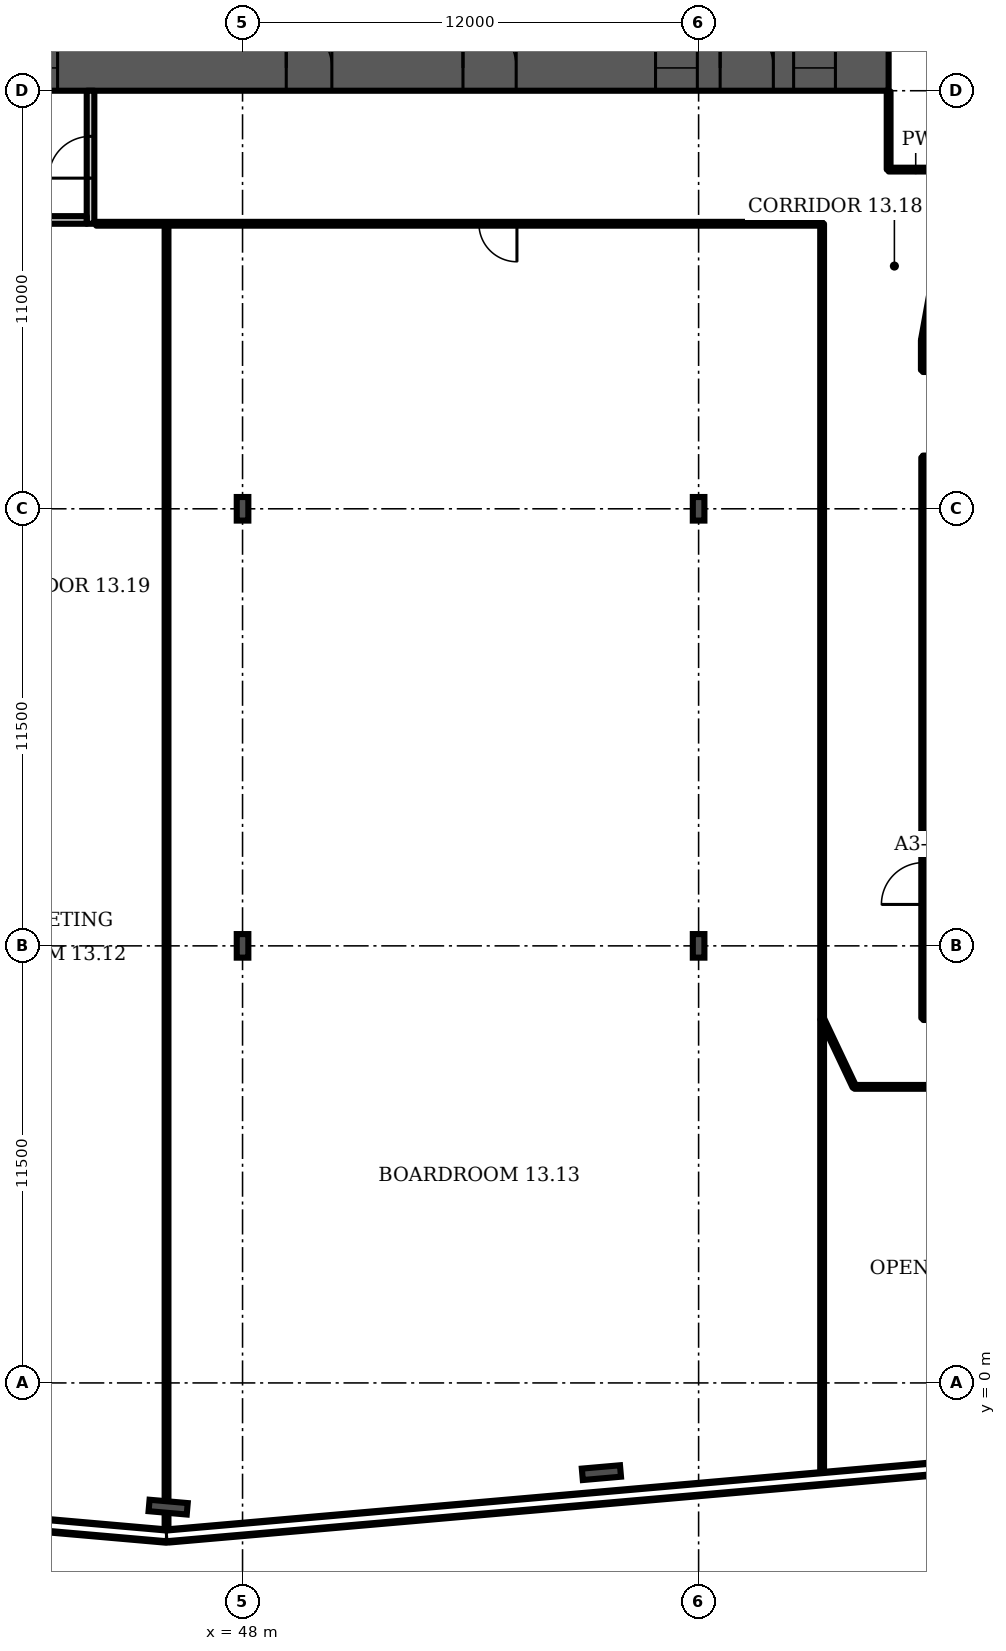
"""IFC4 building model, lengths in metres.
Left out: names, types, materials, properties, quantities, classifications, styles, units other than length and angle.
Written with IfcOpenShell. Run it as: python <this file> out.ifc"""

import sys

from ifc_helpers import new_model, si_unit, direction, frame, frame_2d, origin, origin_2d, place, context, subcontext, project, spatial, rectangle, i_section, extrude, element, fill, save


model = new_model("IFC4")
c1 = context("Model", 3, precision=1e-05, world=origin(), true_north=direction((0.0, 1.0)))
c2 = subcontext(c1, "Body", "Model", "MODEL_VIEW")
j1 = project(units=[si_unit("LENGTHUNIT", "METRE"), si_unit("PLANEANGLEUNIT", "RADIAN")], contexts=[c1])
p1 = place(None, origin())
s1 = spatial("IfcSite", under=j1, at=p1, CompositionType="ELEMENT")
p2 = place(p1, origin())
s2 = spatial("IfcBuilding", under=s1, at=p2, CompositionType="ELEMENT")
p3 = place(p2, frame((0.0, 0.0, 66.7)))
s3 = spatial("IfcBuildingStorey", under=s2, at=p3, CompositionType="ELEMENT", Elevation=66.7)
p4 = place(p3, frame((9.0, 34.6, 0.0), z_axis=(0.0, 0.0, 1.0), x_axis=(1.0, 0.0, 0.0)))
e1 = element("IfcWall", 1, at=p4, inside=s3, PredefinedType="SHEAR", context=c2, shape_type="SweptSolid", body=[
    extrude(rectangle(XDim=56.0, YDim=1.2, at=frame_2d((28.0, 0.0))), origin(), (0.0, 0.0, 1.0), 3.6),
])
p5 = place(p4, frame((2.0, 0.0, 0.0)))
e2 = element("IfcOpeningElement", 2, at=p5, cuts=e1, PredefinedType="OPENING", context=c2, shape_type="SweptSolid", body=[
    extrude(rectangle(XDim=1.0, YDim=2.1, at=frame_2d((0.5, 1.05))), frame((0.0, 0.61, 0.0), z_axis=(0.0, -1.0, 0.0), x_axis=(1.0, 0.0, 0.0)), (0.0, 0.0, 1.0), 1.22),
])
p6 = place(p4, frame((4.6, 0.0, 0.0)))
e3 = element("IfcOpeningElement", 3, at=p6, cuts=e1, PredefinedType="OPENING", context=c2, shape_type="SweptSolid", body=[
    extrude(rectangle(XDim=1.0, YDim=2.1, at=frame_2d((0.5, 1.05))), frame((0.0, 0.61, 0.0), z_axis=(0.0, -1.0, 0.0), x_axis=(1.0, 0.0, 0.0)), (0.0, 0.0, 1.0), 1.22),
])
p7 = place(p4, frame((7.867, 0.0, 0.0)))
e4 = element("IfcOpeningElement", 4, at=p7, cuts=e1, PredefinedType="OPENING", context=c2, shape_type="SweptSolid", body=[
    extrude(rectangle(XDim=1.1, YDim=2.1, at=frame_2d((0.55, 1.05))), frame((0.0, 0.61, 0.0), z_axis=(0.0, -1.0, 0.0), x_axis=(1.0, 0.0, 0.0)), (0.0, 0.0, 1.0), 1.22),
])
p8 = place(p4, frame((12.033, 0.0, 0.0)))
e5 = element("IfcOpeningElement", 5, at=p8, cuts=e1, PredefinedType="OPENING", context=c2, shape_type="SweptSolid", body=[
    extrude(rectangle(XDim=1.1, YDim=2.1, at=frame_2d((0.55, 1.05))), frame((0.0, 0.61, 0.0), z_axis=(0.0, -1.0, 0.0), x_axis=(1.0, 0.0, 0.0)), (0.0, 0.0, 1.0), 1.22),
])
p9 = place(p4, frame((9.8, 0.0, 0.0)))
e6 = element("IfcOpeningElement", 6, at=p9, cuts=e1, PredefinedType="OPENING", context=c2, shape_type="SweptSolid", body=[
    extrude(rectangle(XDim=1.4, YDim=2.1, at=frame_2d((0.7, 1.05))), frame((0.0, 0.61, 0.0), z_axis=(0.0, -1.0, 0.0), x_axis=(1.0, 0.0, 0.0)), (0.0, 0.0, 1.0), 1.22),
])
p10 = place(p4, frame((14.65, 0.0, 0.0)))
e7 = element("IfcOpeningElement", 7, at=p10, cuts=e1, PredefinedType="OPENING", context=c2, shape_type="SweptSolid", body=[
    extrude(rectangle(XDim=1.2, YDim=2.1, at=frame_2d((0.6, 1.05))), frame((0.0, 0.61, 0.0), z_axis=(0.0, -1.0, 0.0), x_axis=(1.0, 0.0, 0.0)), (0.0, 0.0, 1.0), 1.22),
])
p11 = place(p4, frame((21.867, 0.0, 0.0)))
e8 = element("IfcOpeningElement", 8, at=p11, cuts=e1, PredefinedType="OPENING", context=c2, shape_type="SweptSolid", body=[
    extrude(rectangle(XDim=1.1, YDim=2.1, at=frame_2d((0.55, 1.05))), frame((0.0, 0.61, 0.0), z_axis=(0.0, -1.0, 0.0), x_axis=(1.0, 0.0, 0.0)), (0.0, 0.0, 1.0), 1.22),
])
p12 = place(p4, frame((26.033, 0.0, 0.0)))
e9 = element("IfcOpeningElement", 9, at=p12, cuts=e1, PredefinedType="OPENING", context=c2, shape_type="SweptSolid", body=[
    extrude(rectangle(XDim=1.1, YDim=2.1, at=frame_2d((0.55, 1.05))), frame((0.0, 0.61, 0.0), z_axis=(0.0, -1.0, 0.0), x_axis=(1.0, 0.0, 0.0)), (0.0, 0.0, 1.0), 1.22),
])
p13 = place(p4, frame((23.8, 0.0, 0.0)))
e10 = element("IfcOpeningElement", 10, at=p13, cuts=e1, PredefinedType="OPENING", context=c2, shape_type="SweptSolid", body=[
    extrude(rectangle(XDim=1.4, YDim=2.1, at=frame_2d((0.7, 1.05))), frame((0.0, 0.61, 0.0), z_axis=(0.0, -1.0, 0.0), x_axis=(1.0, 0.0, 0.0)), (0.0, 0.0, 1.0), 1.22),
])
p14 = place(p4, frame((28.867, 0.0, 0.0)))
e11 = element("IfcOpeningElement", 11, at=p14, cuts=e1, PredefinedType="OPENING", context=c2, shape_type="SweptSolid", body=[
    extrude(rectangle(XDim=1.1, YDim=2.1, at=frame_2d((0.55, 1.05))), frame((0.0, 0.61, 0.0), z_axis=(0.0, -1.0, 0.0), x_axis=(1.0, 0.0, 0.0)), (0.0, 0.0, 1.0), 1.22),
])
p15 = place(p4, frame((33.033, 0.0, 0.0)))
e12 = element("IfcOpeningElement", 12, at=p15, cuts=e1, PredefinedType="OPENING", context=c2, shape_type="SweptSolid", body=[
    extrude(rectangle(XDim=1.1, YDim=2.1, at=frame_2d((0.55, 1.05))), frame((0.0, 0.61, 0.0), z_axis=(0.0, -1.0, 0.0), x_axis=(1.0, 0.0, 0.0)), (0.0, 0.0, 1.0), 1.22),
])
p16 = place(p4, frame((40.15, 0.0, 0.0)))
e13 = element("IfcOpeningElement", 13, at=p16, cuts=e1, PredefinedType="OPENING", context=c2, shape_type="SweptSolid", body=[
    extrude(rectangle(XDim=1.2, YDim=2.1, at=frame_2d((0.6, 1.05))), frame((0.0, 0.61, 0.0), z_axis=(0.0, -1.0, 0.0), x_axis=(1.0, 0.0, 0.0)), (0.0, 0.0, 1.0), 1.22),
])
p17 = place(p4, frame((44.8, 0.0, 0.0)))
e14 = element("IfcOpeningElement", 14, at=p17, cuts=e1, PredefinedType="OPENING", context=c2, shape_type="SweptSolid", body=[
    extrude(rectangle(XDim=1.4, YDim=2.1, at=frame_2d((0.7, 1.05))), frame((0.0, 0.61, 0.0), z_axis=(0.0, -1.0, 0.0), x_axis=(1.0, 0.0, 0.0)), (0.0, 0.0, 1.0), 1.22),
])
p18 = place(p4, frame((49.867, 0.0, 0.0)))
e15 = element("IfcOpeningElement", 15, at=p18, cuts=e1, PredefinedType="OPENING", context=c2, shape_type="SweptSolid", body=[
    extrude(rectangle(XDim=1.1, YDim=2.1, at=frame_2d((0.55, 1.05))), frame((0.0, 0.61, 0.0), z_axis=(0.0, -1.0, 0.0), x_axis=(1.0, 0.0, 0.0)), (0.0, 0.0, 1.0), 1.22),
])
p19 = place(p4, frame((53.5, 0.0, 0.0)))
e16 = element("IfcOpeningElement", 16, at=p19, cuts=e1, PredefinedType="OPENING", context=c2, shape_type="SweptSolid", body=[
    extrude(rectangle(XDim=1.1, YDim=2.1, at=frame_2d((0.55, 1.05))), frame((0.0, 0.61, 0.0), z_axis=(0.0, -1.0, 0.0), x_axis=(1.0, 0.0, 0.0)), (0.0, 0.0, 1.0), 1.22),
])
p20 = place(p4, frame((51.567, 0.0, 0.0)))
e17 = element("IfcOpeningElement", 17, at=p20, cuts=e1, PredefinedType="OPENING", context=c2, shape_type="SweptSolid", body=[
    extrude(rectangle(XDim=1.4, YDim=2.1, at=frame_2d((0.7, 1.05))), frame((0.0, 0.61, 0.0), z_axis=(0.0, -1.0, 0.0), x_axis=(1.0, 0.0, 0.0)), (0.0, 0.0, 1.0), 1.22),
])
for number, where, z_axis, x_axis in (
    (18, (46.042, -3.268, 0.0), (0.0, 0.0, 1.0), (-0.087, -0.996, 0.0)),
    (19, (57.442, -2.361, 0.0), (0.0, 0.0, 1.0), (0.087, -0.996, 0.0)),
):
    element("IfcColumn", number, at=place(p3, frame(where, z_axis=z_axis, x_axis=x_axis)), inside=s3, PredefinedType="COLUMN", context=c2, shape_type="SweptSolid", body=[
        extrude(i_section(OverallWidth=0.302, OverallDepth=1.008, WebThickness=0.021, FlangeThickness=0.04, FilletRadius=0.03, at=origin_2d()), origin(), (0.0, 0.0, 1.0), 3.6),
    ])
for number, where, z_axis, x_axis in (
    (20, (48.0, 11.5, 0.0), (0.0, 0.0, 1.0), (1.0, 0.0, 0.0)),
    (21, (60.0, 11.5, 0.0), (0.0, 0.0, 1.0), (1.0, 0.0, 0.0)),
    (22, (48.0, 23.0, 0.0), (0.0, 0.0, 1.0), (1.0, 0.0, 0.0)),
    (23, (60.0, 23.0, 0.0), (0.0, 0.0, 1.0), (1.0, 0.0, 0.0)),
):
    element("IfcColumn", number, at=place(p3, frame(where, z_axis=z_axis, x_axis=x_axis)), inside=s3, PredefinedType="COLUMN", context=c2, shape_type="SweptSolid", body=[
        extrude(i_section(OverallWidth=0.305, OverallDepth=0.62, WebThickness=0.021, FlangeThickness=0.04, FilletRadius=0.027, at=origin_2d()), origin(), (0.0, 0.0, 1.0), 3.6),
    ])
p21 = place(p3, frame((34.601, -3.032, 0.0), z_axis=(0.0, 0.0, 1.0), x_axis=(0.996193, -0.087148, 0.0)))
e24 = element("IfcWall", 24, at=p21, inside=s3, PredefinedType="SOLIDWALL", context=c2, shape_type="SweptSolid", body=[
    extrude(rectangle(XDim=11.458, YDim=0.35, at=frame_2d((5.729, 0.0))), origin(), (0.0, 0.0, 1.0), 1.0),
])
p22 = place(p3, frame((46.045, -4.026, 0.0), z_axis=(0.0, 0.0, 1.0), x_axis=(0.99619, 0.087163, 0.0)))
e25 = element("IfcWall", 25, at=p22, inside=s3, PredefinedType="SOLIDWALL", context=c2, shape_type="SweptSolid", body=[
    extrude(rectangle(XDim=23.013, YDim=0.35, at=frame_2d((11.506, 0.0))), origin(), (0.0, 0.0, 1.0), 1.0),
])
p23 = place(p3, frame((44.0, 30.5, 0.0), z_axis=(0.0, 0.0, 1.0), x_axis=(0.0, 1.0, 0.0)))
e26 = element("IfcWall", 26, at=p23, inside=s3, PredefinedType="PARTITIONING", context=c2, shape_type="SweptSolid", body=[
    extrude(rectangle(XDim=3.5, YDim=0.2, at=frame_2d((1.75, 0.0))), origin(), (0.0, 0.0, 1.0), 3.2),
])
p24 = place(p23, frame((1.2, 0.0, 0.0)))
e27 = element("IfcOpeningElement", 27, at=p24, cuts=e26, PredefinedType="OPENING", context=c2, shape_type="SweptSolid", body=[
    extrude(rectangle(XDim=1.1, YDim=2.1, at=frame_2d((0.55, 1.05))), frame((0.0, 0.11, 0.0), z_axis=(0.0, -1.0, 0.0), x_axis=(1.0, 0.0, 0.0)), (0.0, 0.0, 1.0), 0.22),
])
p25 = place(p3, frame((41.1, 30.6, 0.0), z_axis=(0.0, 0.0, 1.0), x_axis=(1.0, 0.0, 0.0)))
e28 = element("IfcWall", 28, at=p25, inside=s3, PredefinedType="PARTITIONING", context=c2, shape_type="SweptSolid", body=[
    extrude(rectangle(XDim=2.8, YDim=0.2, at=frame_2d((1.4, 0.0))), origin(), (0.0, 0.0, 1.0), 3.2),
])
p26 = place(p3, frame((46.0, -4.004, 0.0), z_axis=(0.0, 0.0, 1.0), x_axis=(0.0, 1.0, 0.0)))
e29 = element("IfcWall", 29, at=p26, inside=s3, PredefinedType="PARTITIONING", context=c2, shape_type="SweptSolid", body=[
    extrude(rectangle(XDim=34.504, YDim=0.1, at=frame_2d((17.252, 0.0))), origin(), (0.0, 0.0, 1.0), 3.2),
])
p27 = place(p3, frame((63.25, -2.495, 0.0), z_axis=(0.0, 0.0, 1.0), x_axis=(0.0, 1.0, 0.0)))
e30 = element("IfcWall", 30, at=p27, inside=s3, PredefinedType="PARTITIONING", context=c2, shape_type="SweptSolid", body=[
    extrude(rectangle(XDim=32.995, YDim=0.1, at=frame_2d((16.498, 0.0))), origin(), (0.0, 0.0, 1.0), 2.58),
])
p28 = place(p3, frame((64.1, 7.79, 0.0), z_axis=(0.0, 0.0, 1.0), x_axis=(1.0, 0.0, 0.0)))
e31 = element("IfcWall", 31, at=p28, inside=s3, PredefinedType="PARTITIONING", context=c2, shape_type="SweptSolid", body=[
    extrude(rectangle(XDim=8.417, YDim=0.1, at=frame_2d((4.209, 0.0))), origin(), (0.0, 0.0, 1.0), 3.2),
])
p29 = place(p28, frame((2.913, 0.0, 0.0)))
e32 = element("IfcOpeningElement", 32, at=p29, cuts=e31, PredefinedType="OPENING", context=c2, shape_type="SweptSolid", body=[
    extrude(rectangle(XDim=1.0, YDim=2.1, at=frame_2d((0.5, 1.05))), frame((0.0, 0.06, 0.0), z_axis=(0.0, -1.0, 0.0), x_axis=(1.0, 0.0, 0.0)), (0.0, 0.0, 1.0), 0.12),
])
p30 = place(p3, frame((64.1, 7.79, 0.0), z_axis=(0.0, 0.0, 1.0), x_axis=(-0.428035, 0.903766, 0.0)))
e33 = element("IfcWall", 33, at=p30, inside=s3, PredefinedType="PARTITIONING", context=c2, shape_type="SweptSolid", body=[
    extrude(rectangle(XDim=1.986, YDim=0.1, at=frame_2d((0.993, 0.0))), origin(), (0.0, 0.0, 1.0), 3.2),
])
p31 = place(p3, frame((65.0, 31.925, 0.0), z_axis=(0.0, 0.0, 1.0), x_axis=(0.0, 1.0, 0.0)))
e34 = element("IfcWall", 34, at=p31, inside=s3, PredefinedType="PARTITIONING", context=c2, shape_type="SweptSolid", body=[
    extrude(rectangle(XDim=2.055, YDim=0.1, at=frame_2d((1.027, 0.0))), origin(), (0.0, 0.0, 1.0), 3.2),
])
p32 = place(p3, frame((65.0, 31.925, 0.0), z_axis=(0.0, 0.0, 1.0), x_axis=(1.0, 0.0, 0.0)))
e35 = element("IfcWall", 35, at=p32, inside=s3, PredefinedType="PARTITIONING", context=c2, shape_type="SweptSolid", body=[
    extrude(rectangle(XDim=1.425, YDim=0.1, at=frame_2d((0.712, 0.0))), origin(), (0.0, 0.0, 1.0), 3.2),
])
p33 = place(p3, frame((65.9, 24.35, 0.0), z_axis=(0.0, 0.0, 1.0), x_axis=(1.0, 0.0, 0.0)))
e36 = element("IfcWall", 36, at=p33, inside=s3, PredefinedType="PARTITIONING", context=c2, shape_type="SweptSolid", body=[
    extrude(rectangle(XDim=6.205, YDim=0.1, at=frame_2d((3.103, 0.0))), origin(), (0.0, 0.0, 1.0), 3.2),
])
p34 = place(p33, frame((0.265, 0.0, 0.0)))
e37 = element("IfcOpeningElement", 37, at=p34, cuts=e36, PredefinedType="OPENING", context=c2, shape_type="SweptSolid", body=[
    extrude(rectangle(XDim=1.0, YDim=2.1, at=frame_2d((0.5, 1.05))), frame((0.0, 0.06, 0.0), z_axis=(0.0, -1.0, 0.0), x_axis=(1.0, 0.0, 0.0)), (0.0, 0.0, 1.0), 0.12),
])
p35 = place(p3, frame((65.9, 26.65, 0.0), z_axis=(0.0, 0.0, 1.0), x_axis=(0.0, 1.0, 0.0)))
e38 = element("IfcWall", 38, at=p35, inside=s3, PredefinedType="PARTITIONING", context=c2, shape_type="SweptSolid", body=[
    extrude(rectangle(XDim=0.785, YDim=0.1, at=frame_2d((0.393, 0.0))), origin(), (0.0, 0.0, 1.0), 3.2),
])
p36 = place(p3, frame((65.9, 26.65, 0.0), z_axis=(0.0, 0.0, 1.0), x_axis=(1.0, 0.0, 0.0)))
e39 = element("IfcWall", 39, at=p36, inside=s3, PredefinedType="PARTITIONING", context=c2, shape_type="SweptSolid", body=[
    extrude(rectangle(XDim=6.205, YDim=0.1, at=frame_2d((3.103, 0.0))), origin(), (0.0, 0.0, 1.0), 3.2),
])
p37 = place(p36, frame((1.805, 0.0, 0.0)))
e40 = element("IfcOpeningElement", 40, at=p37, cuts=e39, PredefinedType="OPENING", context=c2, shape_type="SweptSolid", body=[
    extrude(rectangle(XDim=1.8, YDim=2.1, at=frame_2d((0.9, 1.05))), frame((0.0, 0.06, 0.0), z_axis=(0.0, -1.0, 0.0), x_axis=(1.0, 0.0, 0.0)), (0.0, 0.0, 1.0), 0.12),
])
p38 = place(p3, frame((65.9, 27.435, 0.0), z_axis=(0.0, 0.0, 1.0), x_axis=(0.178584, 0.983924, 0.0)))
e41 = element("IfcWall", 41, at=p38, inside=s3, PredefinedType="PARTITIONING", context=c2, shape_type="SweptSolid", body=[
    extrude(rectangle(XDim=2.353, YDim=0.1, at=frame_2d((1.176, 0.0))), origin(), (0.0, 0.0, 1.0), 3.2),
])
p39 = place(p3, frame((65.91, 9.6, 0.0), z_axis=(0.0, 0.0, 1.0), x_axis=(0.0, 1.0, 0.0)))
e42 = element("IfcWall", 42, at=p39, inside=s3, PredefinedType="PARTITIONING", context=c2, shape_type="SweptSolid", body=[
    extrude(rectangle(XDim=14.75, YDim=0.1, at=frame_2d((7.375, 0.0))), origin(), (0.0, 0.0, 1.0), 3.2),
])
p40 = place(p39, frame((2.99, 0.0, 0.0)))
e43 = element("IfcOpeningElement", 43, at=p40, cuts=e42, PredefinedType="OPENING", context=c2, shape_type="SweptSolid", body=[
    extrude(rectangle(XDim=1.1, YDim=2.1, at=frame_2d((0.55, 1.05))), frame((0.0, 0.06, 0.0), z_axis=(0.0, -1.0, 0.0), x_axis=(1.0, 0.0, 0.0)), (0.0, 0.0, 1.0), 0.12),
])
p41 = place(p3, frame((65.91, 9.6, 0.0), z_axis=(0.0, 0.0, 1.0), x_axis=(1.0, 0.0, 0.0)))
e44 = element("IfcWall", 44, at=p41, inside=s3, PredefinedType="PARTITIONING", context=c2, shape_type="SweptSolid", body=[
    extrude(rectangle(XDim=9.485, YDim=0.1, at=frame_2d((4.743, 0.0))), origin(), (0.0, 0.0, 1.0), 3.2),
])
p42 = place(p3, frame((65.91, 18.595, 0.0), z_axis=(0.0, 0.0, 1.0), x_axis=(1.0, 0.0, 0.0)))
e45 = element("IfcWall", 45, at=p42, inside=s3, PredefinedType="PARTITIONING", context=c2, shape_type="SweptSolid", body=[
    extrude(rectangle(XDim=8.84, YDim=0.1, at=frame_2d((4.42, 0.0))), origin(), (0.0, 0.0, 1.0), 3.2),
])
p43 = place(p3, frame((44.15, 30.5, 0.0), z_axis=(0.0, 0.0, 1.0), x_axis=(1.0, 0.0, 0.0)))
e46 = element("IfcWall", 46, at=p43, inside=s3, PredefinedType="PARTITIONING", context=c2, shape_type="SweptSolid", body=[
    extrude(rectangle(XDim=19.1, YDim=0.1, at=frame_2d((9.55, 0.0))), origin(), (0.0, 0.0, 1.0), 3.2),
])
p44 = place(p43, frame((10.07, 0.0, 0.0)))
e47 = element("IfcOpeningElement", 47, at=p44, cuts=e46, PredefinedType="OPENING", context=c2, shape_type="SweptSolid", body=[
    extrude(rectangle(XDim=1.0, YDim=2.1, at=frame_2d((0.5, 1.05))), frame((0.0, 0.06, 0.0), z_axis=(0.0, -1.0, 0.0), x_axis=(1.0, 0.0, 0.0)), (0.0, 0.0, 1.0), 0.12),
])
p45 = place(p15, origin())
e48 = element("IfcDoor", 48, at=p45, inside=s3, OperationType="DOUBLE_DOOR_SLIDING", PredefinedType="DOOR", context=c2, shape_type="SweptSolid", body=[
    extrude(rectangle(XDim=1.1, YDim=2.1, at=frame_2d((0.55, 1.05))), frame((0.0, 0.025, 0.0), z_axis=(0.0, -1.0, 0.0), x_axis=(1.0, 0.0, 0.0)), (0.0, 0.0, 1.0), 0.05),
])
fill(e12, e48)
p46 = place(p16, origin())
e49 = element("IfcDoor", 49, at=p46, inside=s3, OperationType="SINGLE_SWING_LEFT", PredefinedType="DOOR", context=c2, shape_type="SweptSolid", body=[
    extrude(rectangle(XDim=1.2, YDim=2.1, at=frame_2d((0.6, 1.05))), frame((0.0, 0.025, 0.0), z_axis=(0.0, -1.0, 0.0), x_axis=(1.0, 0.0, 0.0)), (0.0, 0.0, 1.0), 0.05),
])
fill(e13, e49)
p47 = place(p17, origin())
e50 = element("IfcDoor", 50, at=p47, inside=s3, OperationType="DOUBLE_DOOR_SINGLE_SWING", PredefinedType="DOOR", context=c2, shape_type="SweptSolid", body=[
    extrude(rectangle(XDim=1.4, YDim=2.1, at=frame_2d((0.7, 1.05))), frame((0.0, 0.025, 0.0), z_axis=(0.0, -1.0, 0.0), x_axis=(1.0, 0.0, 0.0)), (0.0, 0.0, 1.0), 0.05),
])
fill(e14, e50)
p48 = place(p18, origin())
e51 = element("IfcDoor", 51, at=p48, inside=s3, OperationType="DOUBLE_DOOR_SLIDING", PredefinedType="DOOR", context=c2, shape_type="SweptSolid", body=[
    extrude(rectangle(XDim=1.1, YDim=2.1, at=frame_2d((0.55, 1.05))), frame((0.0, 0.025, 0.0), z_axis=(0.0, -1.0, 0.0), x_axis=(1.0, 0.0, 0.0)), (0.0, 0.0, 1.0), 0.05),
])
fill(e15, e51)
p49 = place(p19, origin())
e52 = element("IfcDoor", 52, at=p49, inside=s3, OperationType="DOUBLE_DOOR_SLIDING", PredefinedType="DOOR", context=c2, shape_type="SweptSolid", body=[
    extrude(rectangle(XDim=1.1, YDim=2.1, at=frame_2d((0.55, 1.05))), frame((0.0, 0.025, 0.0), z_axis=(0.0, -1.0, 0.0), x_axis=(1.0, 0.0, 0.0)), (0.0, 0.0, 1.0), 0.05),
])
fill(e16, e52)
p50 = place(p20, origin())
e53 = element("IfcDoor", 53, at=p50, inside=s3, OperationType="DOUBLE_DOOR_SINGLE_SWING", PredefinedType="DOOR", context=c2, shape_type="SweptSolid", body=[
    extrude(rectangle(XDim=1.4, YDim=2.1, at=frame_2d((0.7, 1.05))), frame((0.0, 0.025, 0.0), z_axis=(0.0, -1.0, 0.0), x_axis=(1.0, 0.0, 0.0)), (0.0, 0.0, 1.0), 0.05),
])
fill(e17, e53)
p51 = place(p24, origin())
e54 = element("IfcDoor", 54, at=p51, inside=s3, OperationType="SINGLE_SWING_LEFT", PredefinedType="DOOR", context=c2, shape_type="SweptSolid", body=[
    extrude(rectangle(XDim=1.1, YDim=2.1, at=frame_2d((0.55, 1.05))), frame((0.0, 0.025, 0.0), z_axis=(0.0, -1.0, 0.0), x_axis=(1.0, 0.0, 0.0)), (0.0, 0.0, 1.0), 0.05),
])
fill(e27, e54)
p52 = place(p40, origin())
e55 = element("IfcDoor", 55, at=p52, inside=s3, OperationType="SINGLE_SWING_LEFT", PredefinedType="DOOR", context=c2, shape_type="SweptSolid", body=[
    extrude(rectangle(XDim=1.1, YDim=2.1, at=frame_2d((0.55, 1.05))), frame((0.0, 0.025, 0.0), z_axis=(0.0, -1.0, 0.0), x_axis=(1.0, 0.0, 0.0)), (0.0, 0.0, 1.0), 0.05),
])
fill(e43, e55)
p53 = place(p44, origin())
e56 = element("IfcDoor", 56, at=p53, inside=s3, OperationType="SINGLE_SWING_RIGHT", PredefinedType="DOOR", context=c2, shape_type="SweptSolid", body=[
    extrude(rectangle(XDim=1.0, YDim=2.1, at=frame_2d((0.5, 1.05))), frame((0.0, 0.025, 0.0), z_axis=(0.0, -1.0, 0.0), x_axis=(1.0, 0.0, 0.0)), (0.0, 0.0, 1.0), 0.05),
])
fill(e47, e56)
save(model, sys.argv[1])
